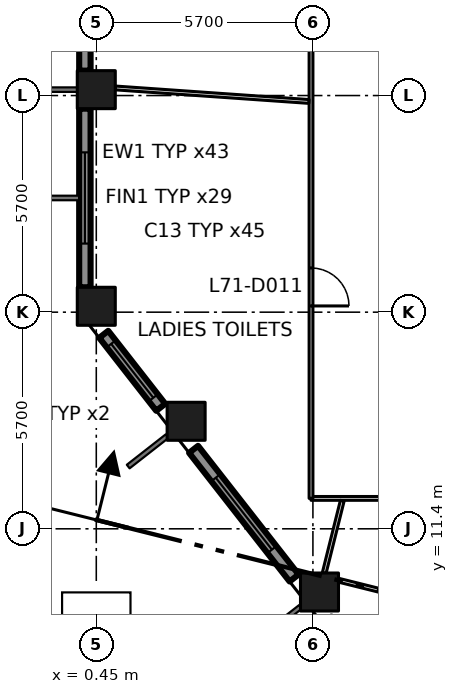
"""IFC4 building model, lengths in metres.
Left out: names, types, materials, properties, quantities, classifications, styles, units other than length and angle.
Written with IfcOpenShell. Run it as: python <this file> out.ifc"""

import sys

from ifc_helpers import new_model, si_unit, direction, frame, frame_2d, origin, origin_2d, place, context, subcontext, project, spatial, rectangle, extrude, element, fill, save


model = new_model("IFC4")
c1 = context("Model", 3, precision=1e-05, world=origin(), true_north=direction((0.0, 1.0)))
c2 = subcontext(c1, "Body", "Model", "MODEL_VIEW")
j1 = project(units=[si_unit("LENGTHUNIT", "METRE"), si_unit("PLANEANGLEUNIT", "RADIAN")], contexts=[c1])
p1 = place(None, origin())
s1 = spatial("IfcSite", under=j1, at=p1, CompositionType="ELEMENT")
p2 = place(p1, origin())
s2 = spatial("IfcBuilding", under=s1, at=p2, CompositionType="ELEMENT")
p3 = place(p2, frame((0.0, 0.0, 310.8)))
s3 = spatial("IfcBuildingStorey", under=s2, at=p3, CompositionType="ELEMENT", Elevation=310.8)
for number, where, z_axis, x_axis in (
    (1, (0.45, 17.255, 0.0), (0.0, 0.0, 1.0), (1.0, 0.0, 0.0)),
    (2, (0.45, 22.955, 0.0), (0.0, 0.0, 1.0), (1.0, 0.0, 0.0)),
    (3, (6.323, 9.737, 0.0), (0.0, 0.0, 1.0), (1.0, 0.0, 0.0)),
    (4, (2.814, 14.229, 0.0), (0.0, 0.0, 1.0), (1.0, 0.0, 0.0)),
):
    element("IfcColumn", number, at=place(p3, frame(where, z_axis=z_axis, x_axis=x_axis)), inside=s3, PredefinedType="COLUMN", context=c2, shape_type="SweptSolid", body=[
        extrude(rectangle(XDim=1.0, YDim=1.0, at=origin_2d()), origin(), (0.0, 0.0, 1.0), 4.2),
    ])
p4 = place(p3, frame((0.15, 28.155, 0.0), z_axis=(0.0, 0.0, 1.0), x_axis=(0.0, -1.0, 0.0)))
e5 = element("IfcWall", 5, at=p4, inside=s3, PredefinedType="SOLIDWALL", context=c2, shape_type="SweptSolid", body=[
    extrude(rectangle(XDim=4.7, YDim=0.3, at=frame_2d((2.35, 0.0))), origin(), (0.0, 0.0, 1.0), 3.2),
])
p5 = place(p4, frame((1.15, 0.0, 0.8)))
e6 = element("IfcOpeningElement", 6, at=p5, cuts=e5, PredefinedType="OPENING", context=c2, shape_type="SweptSolid", body=[
    extrude(rectangle(XDim=2.4, YDim=2.1, at=frame_2d((1.2, 1.05))), frame((0.0, 0.16, 0.0), z_axis=(0.0, -1.0, 0.0), x_axis=(1.0, 0.0, 0.0)), (0.0, 0.0, 1.0), 0.32),
])
p6 = place(p3, frame((0.15, 22.455, 0.0), z_axis=(0.0, 0.0, 1.0), x_axis=(0.0, -1.0, 0.0)))
e7 = element("IfcWall", 7, at=p6, inside=s3, PredefinedType="SOLIDWALL", context=c2, shape_type="SweptSolid", body=[
    extrude(rectangle(XDim=4.7, YDim=0.3, at=frame_2d((2.35, 0.0))), origin(), (0.0, 0.0, 1.0), 3.2),
])
p7 = place(p6, frame((1.15, 0.0, 0.8)))
e8 = element("IfcOpeningElement", 8, at=p7, cuts=e7, PredefinedType="OPENING", context=c2, shape_type="SweptSolid", body=[
    extrude(rectangle(XDim=2.4, YDim=2.1, at=frame_2d((1.2, 1.05))), frame((0.0, 0.16, 0.0), z_axis=(0.0, -1.0, 0.0), x_axis=(1.0, 0.0, 0.0)), (0.0, 0.0, 1.0), 0.32),
])
p8 = place(p3, frame((0.646, 16.517, 0.0), z_axis=(0.0, 0.0, 1.0), x_axis=(0.615610986717, -0.788050197026, 0.0)))
e9 = element("IfcWall", 9, at=p8, inside=s3, PredefinedType="SOLIDWALL", context=c2, shape_type="SweptSolid", body=[
    extrude(rectangle(XDim=2.437, YDim=0.3, at=frame_2d((1.218, 0.0))), origin(), (0.0, 0.0, 1.0), 3.2),
])
p9 = place(p8, frame((0.318, 0.0, 0.8)))
e10 = element("IfcOpeningElement", 10, at=p9, cuts=e9, PredefinedType="OPENING", context=c2, shape_type="SweptSolid", body=[
    extrude(rectangle(XDim=1.8, YDim=2.1, at=frame_2d((0.9, 1.05))), frame((0.0, 0.16, 0.0), z_axis=(0.0, -1.0, 0.0), x_axis=(1.0, 0.0, 0.0)), (0.0, 0.0, 1.0), 0.32),
])
p10 = place(p3, frame((3.01, 13.491, 0.0), z_axis=(0.0, 0.0, 1.0), x_axis=(0.615713519567, -0.787970089421, 0.0)))
e11 = element("IfcWall", 11, at=p10, inside=s3, PredefinedType="SOLIDWALL", context=c2, shape_type="SweptSolid", body=[
    extrude(rectangle(XDim=4.296, YDim=0.3, at=frame_2d((2.148, 0.0))), origin(), (0.0, 0.0, 1.0), 3.2),
])
p11 = place(p10, frame((0.948, 0.0, 0.8)))
e12 = element("IfcOpeningElement", 12, at=p11, cuts=e11, PredefinedType="OPENING", context=c2, shape_type="SweptSolid", body=[
    extrude(rectangle(XDim=2.4, YDim=2.1, at=frame_2d((1.2, 1.05))), frame((0.0, 0.16, 0.0), z_axis=(0.0, -1.0, 0.0), x_axis=(1.0, 0.0, 0.0)), (0.0, 0.0, 1.0), 0.32),
])
p12 = place(p3, frame((6.1, 12.2, 0.0), z_axis=(0.0, 0.0, 1.0), x_axis=(1.0, 0.0, 0.0)))
e13 = element("IfcWall", 13, at=p12, inside=s3, PredefinedType="PARTITIONING", context=c2, shape_type="SweptSolid", body=[
    extrude(rectangle(XDim=3.8, YDim=0.1, at=frame_2d((1.9, 0.0))), origin(), (0.0, 0.0, 1.0), 3.9),
])
p13 = place(p3, frame((6.1, 38.9, 0.0), z_axis=(0.0, 0.0, 1.0), x_axis=(0.0, -1.0, 0.0)))
e14 = element("IfcWall", 14, at=p13, inside=s3, PredefinedType="PARTITIONING", context=c2, shape_type="SweptSolid", body=[
    extrude(rectangle(XDim=26.7, YDim=0.1, at=frame_2d((13.35, 0.0))), origin(), (0.0, 0.0, 1.0), 3.9),
])
p14 = place(p13, frame((20.636, 0.0, 0.0)))
e15 = element("IfcOpeningElement", 15, at=p14, cuts=e14, PredefinedType="OPENING", context=c2, shape_type="SweptSolid", body=[
    extrude(rectangle(XDim=1.0, YDim=2.1, at=frame_2d((0.5, 1.05))), frame((0.0, 0.06, 0.0), z_axis=(0.0, -1.0, 0.0), x_axis=(1.0, 0.0, 0.0)), (0.0, 0.0, 1.0), 0.12),
])
p15 = place(p13, frame((6.88, 0.0, 0.0)))
e16 = element("IfcOpeningElement", 16, at=p15, cuts=e14, PredefinedType="OPENING", context=c2, shape_type="SweptSolid", body=[
    extrude(rectangle(XDim=1.8, YDim=2.1, at=frame_2d((0.9, 1.05))), frame((0.0, 0.06, 0.0), z_axis=(0.0, -1.0, 0.0), x_axis=(1.0, 0.0, 0.0)), (0.0, 0.0, 1.0), 0.12),
])
p16 = place(p3, frame((6.047, 22.644, 0.0), z_axis=(0.0, 0.0, 1.0), x_axis=(-0.997570469691, 0.069664610825, 0.0)))
e17 = element("IfcWall", 17, at=p16, inside=s3, PredefinedType="PARTITIONING", context=c2, shape_type="SweptSolid", body=[
    extrude(rectangle(XDim=5.11, YDim=0.1, at=frame_2d((2.555, 0.0))), origin(), (0.0, 0.0, 1.0), 3.9),
])
p17 = place(p3, frame((6.922, 12.138, 0.0), z_axis=(0.0, 0.0, 1.0), x_axis=(-0.242476987996, -0.970157157523, 0.0)))
e18 = element("IfcWall", 18, at=p17, inside=s3, PredefinedType="PARTITIONING", context=c2, shape_type="SweptSolid", body=[
    extrude(rectangle(XDim=1.959, YDim=0.1, at=frame_2d((0.98, 0.0))), origin(), (0.0, 0.0, 1.0), 3.9),
])
p18 = place(p3, frame((8.72, 9.575, 0.0), z_axis=(0.0, 0.0, 1.0), x_axis=(-0.970274576003, 0.242006708918, 0.0)))
e19 = element("IfcWall", 19, at=p18, inside=s3, PredefinedType="PARTITIONING", context=c2, shape_type="SweptSolid", body=[
    extrude(rectangle(XDim=1.955, YDim=0.1, at=frame_2d((0.978, 0.0))), origin(), (0.0, 0.0, 1.0), 3.9),
])
p19 = place(p7, origin())
e20 = element("IfcWindow", 20, at=p19, inside=s3, PartitioningType="DOUBLE_PANEL_VERTICAL", PredefinedType="WINDOW", context=c2, shape_type="SweptSolid", body=[
    extrude(rectangle(XDim=2.4, YDim=2.1, at=frame_2d((1.2, 1.05))), frame((0.0, 0.03, 0.0), z_axis=(0.0, -1.0, 0.0), x_axis=(1.0, 0.0, 0.0)), (0.0, 0.0, 1.0), 0.06),
])
fill(e8, e20)
p20 = place(p9, origin())
e21 = element("IfcWindow", 21, at=p20, inside=s3, PartitioningType="DOUBLE_PANEL_VERTICAL", PredefinedType="WINDOW", context=c2, shape_type="SweptSolid", body=[
    extrude(rectangle(XDim=1.8, YDim=2.1, at=frame_2d((0.9, 1.05))), frame((0.0, 0.03, 0.0), z_axis=(0.0, -1.0, 0.0), x_axis=(1.0, 0.0, 0.0)), (0.0, 0.0, 1.0), 0.06),
])
fill(e10, e21)
p21 = place(p11, origin())
e22 = element("IfcWindow", 22, at=p21, inside=s3, PartitioningType="DOUBLE_PANEL_VERTICAL", PredefinedType="WINDOW", context=c2, shape_type="SweptSolid", body=[
    extrude(rectangle(XDim=2.4, YDim=2.1, at=frame_2d((1.2, 1.05))), frame((0.0, 0.03, 0.0), z_axis=(0.0, -1.0, 0.0), x_axis=(1.0, 0.0, 0.0)), (0.0, 0.0, 1.0), 0.06),
])
fill(e12, e22)
p22 = place(p14, origin())
e23 = element("IfcDoor", 23, at=p22, inside=s3, OperationType="SINGLE_SWING_RIGHT", PredefinedType="DOOR", context=c2, shape_type="SweptSolid", body=[
    extrude(rectangle(XDim=1.0, YDim=2.1, at=frame_2d((0.5, 1.05))), frame((0.0, 0.025, 0.0), z_axis=(0.0, -1.0, 0.0), x_axis=(1.0, 0.0, 0.0)), (0.0, 0.0, 1.0), 0.05),
])
fill(e15, e23)
save(model, sys.argv[1])
